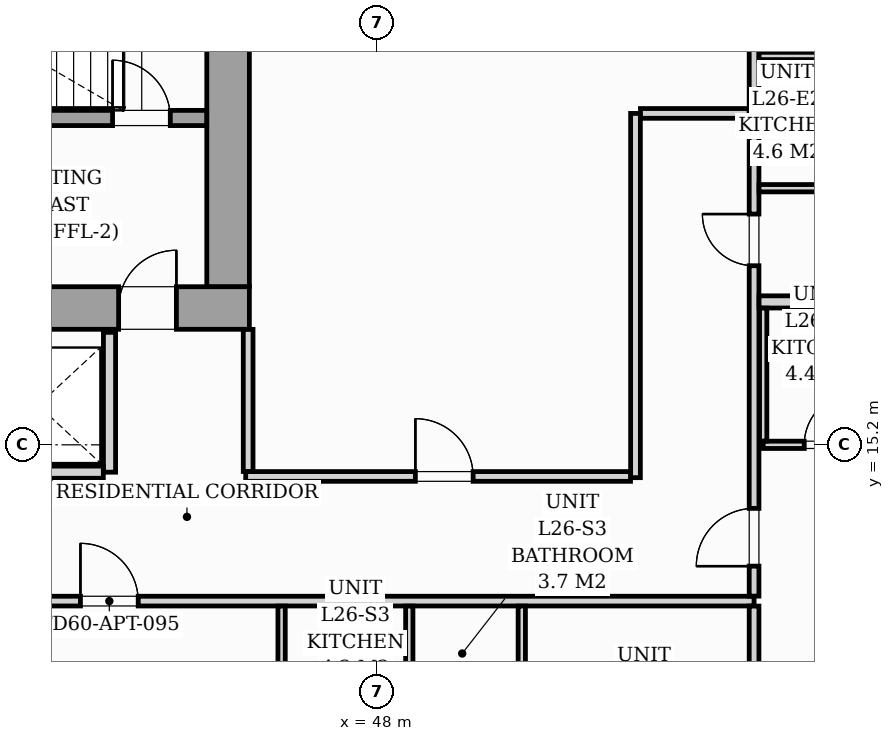
"""IFC4 building model, lengths in metres.
Left out: names, types, materials, properties, quantities, classifications, styles, units other than length and angle.
Written with IfcOpenShell. Run it as: python <this file> out.ifc"""

import sys

from ifc_helpers import new_model, si_unit, direction, frame, frame_2d, origin, origin_2d, place, context, subcontext, project, spatial, rectangle, i_section, extrude, source, transform, mapped, element, fill, save


model = new_model("IFC4")
c1 = context("Model", 3, precision=1e-05, world=origin(), true_north=direction((0.0, 1.0)))
c2 = subcontext(c1, "Body", "Model", "MODEL_VIEW")
j1 = project(units=[si_unit("LENGTHUNIT", "METRE"), si_unit("PLANEANGLEUNIT", "RADIAN")], contexts=[c1])
p1 = place(None, origin())
s1 = spatial("IfcSite", under=j1, at=p1, CompositionType="ELEMENT")
p2 = place(p1, origin())
s2 = spatial("IfcBuilding", under=s1, at=p2, CompositionType="ELEMENT")
p3 = place(p2, frame((0.0, 0.0, 93.8)))
s3 = spatial("IfcBuildingStorey", under=s2, at=p3, CompositionType="ELEMENT", Elevation=93.8)
m1 = source(origin(), c2, "Body", "SweptSolid", [
    extrude(i_section(OverallWidth=0.427, OverallDepth=0.483, WebThickness=0.051, FlangeThickness=0.082, FilletRadius=0.018, at=origin_2d()), origin(), (0.0, 0.0, 1.0), 3.196),
])
p4 = place(p3, frame((45.6, 17.4, 0.002), z_axis=(0.0, 0.0, 1.0), x_axis=(1.0, 0.0, 0.0)))
e1 = element("IfcColumn", 1, at=p4, inside=s3, PredefinedType="PILASTER", context=c2, shape_type="MappedRepresentation", body=[
    mapped(m1, transform((0.0, 0.0, 0.0), scale=1.0)),
])
p5 = place(p3, frame((26.1, 17.45, 0.0), z_axis=(0.0, 0.0, 1.0), x_axis=(1.0, 0.0, 0.0)))
e2 = element("IfcWall", 2, at=p5, inside=s3, PredefinedType="SHEAR", context=c2, shape_type="SweptSolid", body=[
    extrude(rectangle(XDim=19.8, YDim=0.7, at=frame_2d((9.9, 0.0))), origin(), (0.0, 0.0, 1.0), 3.2),
])
p6 = place(p5, frame((1.05, 0.0, 0.0)))
e3 = element("IfcOpeningElement", 3, at=p6, cuts=e2, PredefinedType="OPENING", context=c2, shape_type="SweptSolid", body=[
    extrude(rectangle(XDim=0.95, YDim=2.06, at=frame_2d((0.475, 1.03))), frame((0.0, 0.36, 0.0), z_axis=(0.0, -1.0, 0.0), x_axis=(1.0, 0.0, 0.0)), (0.0, 0.0, 1.0), 0.72),
])
p7 = place(p5, frame((9.48, 0.0, 0.0)))
e4 = element("IfcOpeningElement", 4, at=p7, cuts=e2, PredefinedType="OPENING", context=c2, shape_type="SweptSolid", body=[
    extrude(rectangle(XDim=0.85, YDim=2.0, at=frame_2d((0.425, 1.0))), frame((0.0, 0.36, 0.0), z_axis=(0.0, -1.0, 0.0), x_axis=(1.0, 0.0, 0.0)), (0.0, 0.0, 1.0), 0.72),
])
p8 = place(p5, frame((17.65, 0.0, 0.0)))
e5 = element("IfcOpeningElement", 5, at=p8, cuts=e2, PredefinedType="OPENING", context=c2, shape_type="SweptSolid", body=[
    extrude(rectangle(XDim=0.95, YDim=2.06, at=frame_2d((0.475, 1.03))), frame((0.0, 0.36, 0.0), z_axis=(0.0, -1.0, 0.0), x_axis=(1.0, 0.0, 0.0)), (0.0, 0.0, 1.0), 0.72),
])
p9 = place(p3, frame((45.55, 17.802, 0.0), z_axis=(0.0, 0.0, 1.0), x_axis=(0.0, 1.0, 0.0)))
e6 = element("IfcWall", 6, at=p9, inside=s3, PredefinedType="SHEAR", context=c2, shape_type="SweptSolid", body=[
    extrude(rectangle(XDim=5.796, YDim=0.7, at=frame_2d((2.898, 0.0))), origin(), (0.0, 0.0, 1.0), 3.2),
])
p10 = place(p3, frame((37.05, 20.575, 0.0), z_axis=(0.0, 0.0, 1.0), x_axis=(1.0, 0.0, 0.0)))
e7 = element("IfcWall", 7, at=p10, inside=s3, PredefinedType="SOLIDWALL", context=c2, shape_type="SweptSolid", body=[
    extrude(rectangle(XDim=8.148, YDim=0.25, at=frame_2d((4.074, 0.0))), origin(), (0.0, 0.0, 1.0), 3.2),
])
p11 = place(p10, frame((6.6, 0.0, 0.0)))
e8 = element("IfcOpeningElement", 8, at=p11, cuts=e7, PredefinedType="OPENING", context=c2, shape_type="SweptSolid", body=[
    extrude(rectangle(XDim=0.95, YDim=2.06, at=frame_2d((0.475, 1.03))), frame((0.0, 0.135, 0.0), z_axis=(0.0, -1.0, 0.0), x_axis=(1.0, 0.0, 0.0)), (0.0, 0.0, 1.0), 0.27),
])
p12 = place(p3, frame((43.6, 14.75, 0.0), z_axis=(0.0, 0.0, 1.0), x_axis=(0.0, 1.0, 0.0)))
e9 = element("IfcWall", 9, at=p12, inside=s3, PredefinedType="PARTITIONING", context=c2, shape_type="SweptSolid", body=[
    extrude(rectangle(XDim=2.3, YDim=0.2, at=frame_2d((1.15, 0.0))), origin(), (0.0, 0.0, 1.0), 2.94),
])
p13 = place(p3, frame((41.352, 14.75, 0.0), z_axis=(0.0, 0.0, 1.0), x_axis=(1.0, 0.0, 0.0)))
e10 = element("IfcWall", 10, at=p13, inside=s3, PredefinedType="PARTITIONING", context=c2, shape_type="SweptSolid", body=[
    extrude(rectangle(XDim=2.146, YDim=0.2, at=frame_2d((1.073, 0.0))), origin(), (0.0, 0.0, 1.0), 2.94),
])
p14 = place(p3, frame((16.6, 12.63, 0.0), z_axis=(0.0, 0.0, 1.0), x_axis=(1.0, 0.0, 0.0)))
e11 = element("IfcWall", 11, at=p14, inside=s3, PredefinedType="PARTITIONING", context=c2, shape_type="SweptSolid", body=[
    extrude(rectangle(XDim=37.6, YDim=0.16, at=frame_2d((18.8, 0.0))), origin(), (0.0, 0.0, 1.0), 2.94),
])
p15 = place(p14, frame((1.626, 0.0, 0.0)))
e12 = element("IfcOpeningElement", 12, at=p15, cuts=e11, PredefinedType="OPENING", context=c2, shape_type="SweptSolid", body=[
    extrude(rectangle(XDim=0.95, YDim=2.06, at=frame_2d((0.475, 1.03))), frame((0.0, 0.09, 0.0), z_axis=(0.0, -1.0, 0.0), x_axis=(1.0, 0.0, 0.0)), (0.0, 0.0, 1.0), 0.18),
])
p16 = place(p14, frame((13.46, 0.0, 0.0)))
e13 = element("IfcOpeningElement", 13, at=p16, cuts=e11, PredefinedType="OPENING", context=c2, shape_type="SweptSolid", body=[
    extrude(rectangle(XDim=0.95, YDim=2.06, at=frame_2d((0.475, 1.03))), frame((0.0, 0.09, 0.0), z_axis=(0.0, -1.0, 0.0), x_axis=(1.0, 0.0, 0.0)), (0.0, 0.0, 1.0), 0.18),
])
p17 = place(p14, frame((26.522, 0.0, 0.0)))
e14 = element("IfcOpeningElement", 14, at=p17, cuts=e11, PredefinedType="OPENING", context=c2, shape_type="SweptSolid", body=[
    extrude(rectangle(XDim=0.95, YDim=2.06, at=frame_2d((0.475, 1.03))), frame((0.0, 0.09, 0.0), z_axis=(0.0, -1.0, 0.0), x_axis=(1.0, 0.0, 0.0)), (0.0, 0.0, 1.0), 0.18),
])
p18 = place(p3, frame((54.2, 7.961, 0.0), z_axis=(0.0, 0.0, 1.0), x_axis=(0.0, 1.0, 0.0)))
e15 = element("IfcWall", 15, at=p18, inside=s3, PredefinedType="PARTITIONING", context=c2, shape_type="SweptSolid", body=[
    extrude(rectangle(XDim=4.587, YDim=0.16, at=frame_2d((2.293, 0.0))), origin(), (0.0, 0.0, 1.0), 2.94),
])
p19 = place(p3, frame((54.2, 12.712, 0.0), z_axis=(0.0, 0.0, 1.0), x_axis=(0.0, 1.0, 0.0)))
e16 = element("IfcWall", 16, at=p19, inside=s3, PredefinedType="PARTITIONING", context=c2, shape_type="SweptSolid", body=[
    extrude(rectangle(XDim=14.815, YDim=0.16, at=frame_2d((7.408, 0.0))), origin(), (0.0, 0.0, 1.0), 2.94),
])
p20 = place(p19, frame((0.493, 0.0, 0.0)))
e17 = element("IfcOpeningElement", 17, at=p20, cuts=e16, PredefinedType="OPENING", context=c2, shape_type="SweptSolid", body=[
    extrude(rectangle(XDim=0.95, YDim=2.06, at=frame_2d((0.475, 1.03))), frame((0.0, 0.09, 0.0), z_axis=(0.0, -1.0, 0.0), x_axis=(1.0, 0.0, 0.0)), (0.0, 0.0, 1.0), 0.18),
])
p21 = place(p19, frame((5.433, 0.0, 0.0)))
e18 = element("IfcOpeningElement", 18, at=p21, cuts=e16, PredefinedType="OPENING", context=c2, shape_type="SweptSolid", body=[
    extrude(rectangle(XDim=0.85, YDim=2.0, at=frame_2d((0.425, 1.0))), frame((0.0, 0.09, 0.0), z_axis=(0.0, -1.0, 0.0), x_axis=(1.0, 0.0, 0.0)), (0.0, 0.0, 1.0), 0.18),
])
p22 = place(p3, frame((50.38, 7.594, 0.0), z_axis=(0.0, 0.0, 1.0), x_axis=(0.0, 1.0, 0.0)))
e19 = element("IfcWall", 19, at=p22, inside=s3, PredefinedType="PARTITIONING", context=c2, shape_type="SweptSolid", body=[
    extrude(rectangle(XDim=4.955, YDim=0.12, at=frame_2d((2.477, 0.0))), origin(), (0.0, 0.0, 1.0), 2.94),
])
p23 = place(p22, frame((1.752, 0.0, 0.0)))
e20 = element("IfcOpeningElement", 20, at=p23, cuts=e19, PredefinedType="OPENING", context=c2, shape_type="SweptSolid", body=[
    extrude(rectangle(XDim=0.9, YDim=2.05, at=frame_2d((0.45, 1.025))), frame((0.0, 0.07, 0.0), z_axis=(0.0, -1.0, 0.0), x_axis=(1.0, 0.0, 0.0)), (0.0, 0.0, 1.0), 0.14),
])
for number, where, z_axis, x_axis in (
    (21, (48.53, 10.442, 0.0), (0.0, 0.0, 1.0), (0.0, 1.0, 0.0)),
    (22, (46.43, 10.442, 0.0), (0.0, 0.0, 1.0), (0.0, 1.0, 0.0)),
):
    element("IfcWall", number, at=place(p3, frame(where, z_axis=z_axis, x_axis=x_axis)), inside=s3, PredefinedType="PARTITIONING", context=c2, shape_type="SweptSolid", body=[
        extrude(rectangle(XDim=2.106, YDim=0.12, at=frame_2d((1.053, 0.0))), origin(), (0.0, 0.0, 1.0), 2.94),
    ])
p24 = place(p3, frame((54.282, 17.55, 0.0), z_axis=(0.0, 0.0, 1.0), x_axis=(1.0, 0.0, 0.0)))
e23 = element("IfcWall", 23, at=p24, inside=s3, PredefinedType="PARTITIONING", context=c2, shape_type="SweptSolid", body=[
    extrude(rectangle(XDim=14.655, YDim=0.2, at=frame_2d((7.328, 0.0))), origin(), (0.0, 0.0, 1.0), 2.94),
])
p25 = place(p3, frame((54.35, 15.2, 0.0), z_axis=(0.0, 0.0, 1.0), x_axis=(1.0, 0.0, 0.0)))
e24 = element("IfcWall", 24, at=p25, inside=s3, PredefinedType="PARTITIONING", context=c2, shape_type="SweptSolid", body=[
    extrude(rectangle(XDim=4.2, YDim=0.12, at=frame_2d((2.1, 0.0))), origin(), (0.0, 0.0, 1.0), 2.94),
])
p26 = place(p25, frame((0.675, 0.0, 0.0)))
e25 = element("IfcOpeningElement", 25, at=p26, cuts=e24, PredefinedType="OPENING", context=c2, shape_type="SweptSolid", body=[
    extrude(rectangle(XDim=0.85, YDim=2.05, at=frame_2d((0.425, 1.025))), frame((0.0, 0.07, 0.0), z_axis=(0.0, -1.0, 0.0), x_axis=(1.0, 0.0, 0.0)), (0.0, 0.0, 1.0), 0.14),
])
p27 = place(p25, frame((2.8, 0.0, 0.0)))
e26 = element("IfcOpeningElement", 26, at=p27, cuts=e24, PredefinedType="OPENING", context=c2, shape_type="SweptSolid", body=[
    extrude(rectangle(XDim=0.8, YDim=2.02, at=frame_2d((0.4, 1.01))), frame((0.0, 0.07, 0.0), z_axis=(0.0, -1.0, 0.0), x_axis=(1.0, 0.0, 0.0)), (0.0, 0.0, 1.0), 0.14),
])
p28 = place(p3, frame((54.35, 15.262, 0.0), z_axis=(0.0, 0.0, 1.0), x_axis=(0.0, 1.0, 0.0)))
e27 = element("IfcWall", 27, at=p28, inside=s3, PredefinedType="PARTITIONING", context=c2, shape_type="SweptSolid", body=[
    extrude(rectangle(XDim=2.186, YDim=0.12, at=frame_2d((1.093, 0.0))), origin(), (0.0, 0.0, 1.0), 2.94),
])
for number, where, z_axis, x_axis in (
    (28, (54.282, 21.595, 0.0), (0.0, 0.0, 1.0), (1.0, 0.0, 0.0)),
    (29, (54.282, 19.42, 0.0), (0.0, 0.0, 1.0), (1.0, 0.0, 0.0)),
):
    element("IfcWall", number, at=place(p3, frame(where, z_axis=z_axis, x_axis=x_axis)), inside=s3, PredefinedType="PARTITIONING", context=c2, shape_type="SweptSolid", body=[
        extrude(rectangle(XDim=2.256, YDim=0.12, at=frame_2d((1.128, 0.0))), origin(), (0.0, 0.0, 1.0), 2.94),
    ])
p29 = place(p3, frame((52.25, 14.66, 0.0), z_axis=(0.0, 0.0, 1.0), x_axis=(0.0, 1.0, 0.0)))
e30 = element("IfcWall", 30, at=p29, inside=s3, PredefinedType="PARTITIONING", context=c2, shape_type="SweptSolid", body=[
    extrude(rectangle(XDim=5.99, YDim=0.16, at=frame_2d((2.995, 0.0))), origin(), (0.0, 0.0, 1.0), 2.94),
])
p30 = place(p3, frame((52.332, 20.65, 0.0), z_axis=(0.0, 0.0, 1.0), x_axis=(1.0, 0.0, 0.0)))
e31 = element("IfcWall", 31, at=p30, inside=s3, PredefinedType="PARTITIONING", context=c2, shape_type="SweptSolid", body=[
    extrude(rectangle(XDim=1.786, YDim=0.16, at=frame_2d((0.893, 0.0))), origin(), (0.0, 0.0, 1.0), 2.94),
])
p31 = place(p3, frame((45.84, 14.68, 0.0), z_axis=(0.0, 0.0, 1.0), x_axis=(1.0, 0.0, 0.0)))
e32 = element("IfcWall", 32, at=p31, inside=s3, PredefinedType="PARTITIONING", context=c2, shape_type="SweptSolid", body=[
    extrude(rectangle(XDim=6.328, YDim=0.16, at=frame_2d((3.164, 0.0))), origin(), (0.0, 0.0, 1.0), 2.94),
])
p32 = place(p31, frame((2.79, 0.0, 0.0)))
e33 = element("IfcOpeningElement", 33, at=p32, cuts=e32, PredefinedType="OPENING", context=c2, shape_type="SweptSolid", body=[
    extrude(rectangle(XDim=0.95, YDim=2.06, at=frame_2d((0.475, 1.03))), frame((0.0, 0.09, 0.0), z_axis=(0.0, -1.0, 0.0), x_axis=(1.0, 0.0, 0.0)), (0.0, 0.0, 1.0), 0.18),
])
p33 = place(p3, frame((45.88, 14.762, 0.0), z_axis=(0.0, 0.0, 1.0), x_axis=(0.0, 1.0, 0.0)))
e34 = element("IfcWall", 34, at=p33, inside=s3, PredefinedType="PARTITIONING", context=c2, shape_type="SweptSolid", body=[
    extrude(rectangle(XDim=2.336, YDim=0.16, at=frame_2d((1.168, 0.0))), origin(), (0.0, 0.0, 1.0), 2.94),
])
m2 = source(origin(), c2, "Body", "SweptSolid", [
    extrude(rectangle(XDim=0.95, YDim=2.06, at=frame_2d((0.475, 1.03))), frame((0.0, 0.025, 0.0), z_axis=(0.0, -1.0, 0.0), x_axis=(1.0, 0.0, 0.0)), (0.0, 0.0, 1.0), 0.05),
])
p34 = place(p8, origin())
e35 = element("IfcDoor", 35, at=p34, inside=s3, OperationType="SINGLE_SWING_RIGHT", PredefinedType="DOOR", context=c2, shape_type="MappedRepresentation", body=[
    mapped(m2, transform((0.0, 0.0, 0.0), scale=1.0)),
])
fill(e5, e35)
p35 = place(p11, origin())
e36 = element("IfcDoor", 36, at=p35, inside=s3, OperationType="SINGLE_SWING_LEFT", PredefinedType="DOOR", context=c2, shape_type="MappedRepresentation", body=[
    mapped(m2, transform((0.0, 0.0, 0.0), scale=1.0)),
])
fill(e8, e36)
m3 = source(origin(), c2, "Body", "SweptSolid", [
    extrude(rectangle(XDim=0.95, YDim=2.06, at=frame_2d((0.475, 1.03))), frame((0.0, 0.025, 0.0), z_axis=(0.0, -1.0, 0.0), x_axis=(1.0, 0.0, 0.0)), (0.0, 0.0, 1.0), 0.05),
])
p36 = place(p17, origin())
e37 = element("IfcDoor", 37, at=p36, inside=s3, OperationType="SINGLE_SWING_LEFT", PredefinedType="DOOR", context=c2, shape_type="MappedRepresentation", body=[
    mapped(m3, transform((0.0, 0.0, 0.0), scale=1.0)),
])
fill(e14, e37)
p37 = place(p20, origin())
e38 = element("IfcDoor", 38, at=p37, inside=s3, OperationType="SINGLE_SWING_LEFT", PredefinedType="DOOR", context=c2, shape_type="MappedRepresentation", body=[
    mapped(m3, transform((0.0, 0.0, 0.0), scale=1.0)),
])
fill(e17, e38)
m4 = source(origin(), c2, "Body", "SweptSolid", [
    extrude(rectangle(XDim=0.85, YDim=2.05, at=frame_2d((0.425, 1.025))), frame((0.0, 0.025, 0.0), z_axis=(0.0, -1.0, 0.0), x_axis=(1.0, 0.0, 0.0)), (0.0, 0.0, 1.0), 0.05),
])
p38 = place(p26, origin())
e39 = element("IfcDoor", 39, at=p38, inside=s3, OperationType="SINGLE_SWING_RIGHT", PredefinedType="DOOR", context=c2, shape_type="MappedRepresentation", body=[
    mapped(m4, transform((0.0, 0.0, 0.0), scale=1.0)),
])
fill(e25, e39)
m5 = source(origin(), c2, "Body", "SweptSolid", [
    extrude(rectangle(XDim=0.85, YDim=2.0, at=frame_2d((0.425, 1.0))), frame((0.0, 0.025, 0.0), z_axis=(0.0, -1.0, 0.0), x_axis=(1.0, 0.0, 0.0)), (0.0, 0.0, 1.0), 0.05),
])
p39 = place(p21, origin())
e40 = element("IfcDoor", 40, at=p39, inside=s3, OperationType="SINGLE_SWING_RIGHT", PredefinedType="DOOR", context=c2, shape_type="MappedRepresentation", body=[
    mapped(m5, transform((0.0, 0.0, 0.0), scale=1.0)),
])
fill(e18, e40)
p40 = place(p32, origin())
e41 = element("IfcDoor", 41, at=p40, inside=s3, OperationType="SINGLE_SWING_LEFT", PredefinedType="DOOR", context=c2, shape_type="MappedRepresentation", body=[
    mapped(m3, transform((0.0, 0.0, 0.0), scale=1.0)),
])
fill(e33, e41)
save(model, sys.argv[1])
